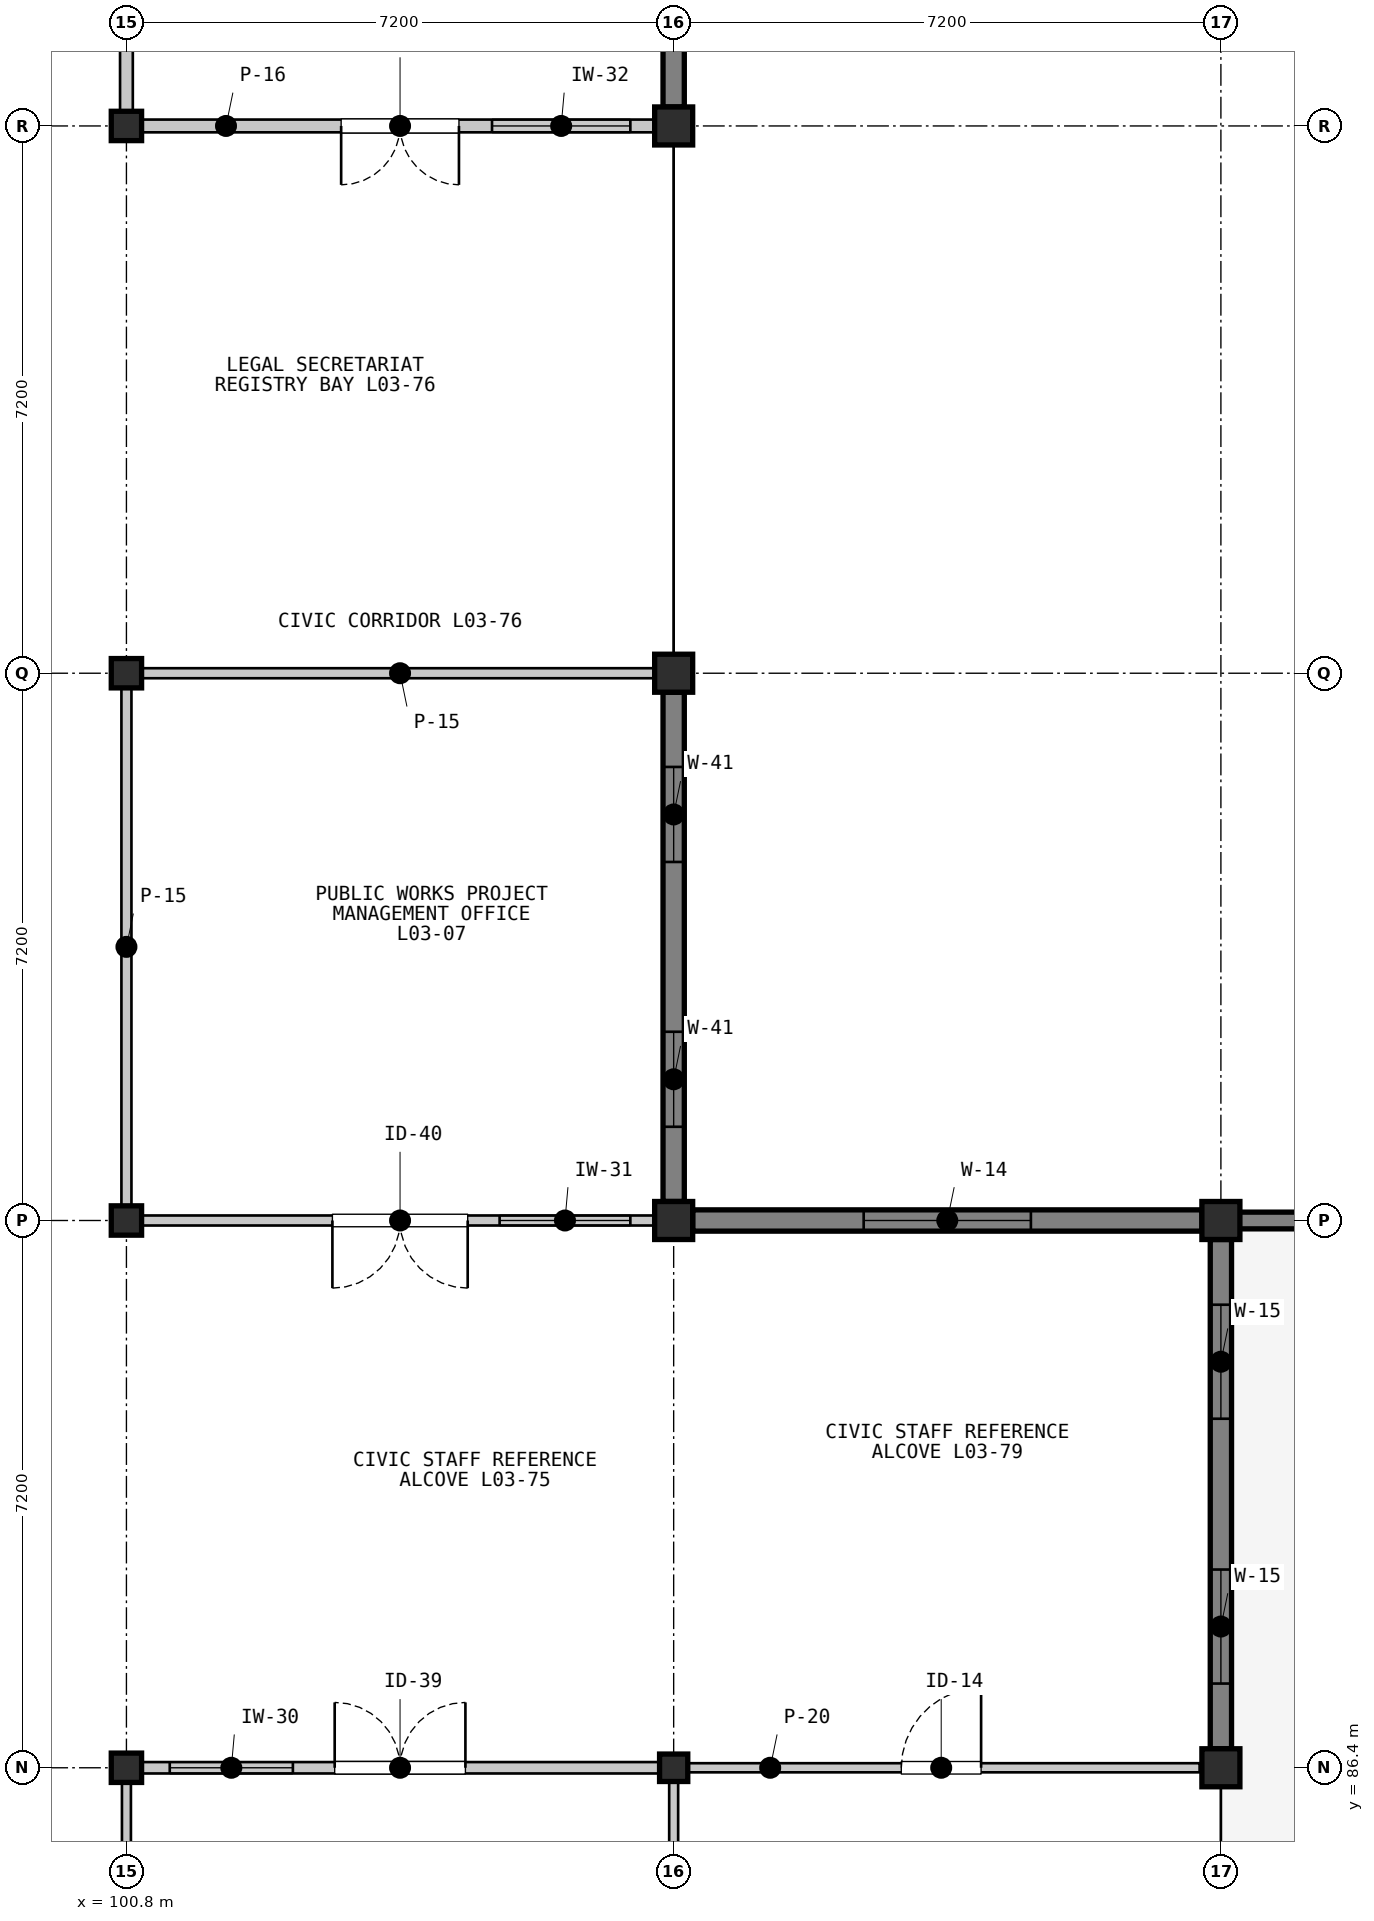
"""IFC4 building model, lengths in metres.
Left out: names, types, materials, properties, quantities, classifications, styles, units other than length and angle.
Written with IfcOpenShell. Run it as: python <this file> out.ifc"""

import sys

from ifc_helpers import new_model, si_unit, direction, frame, frame_2d, origin, origin_2d, place, context, subcontext, project, spatial, rectangle, i_section, extrude, element, fill, save


model = new_model("IFC4")
c1 = context("Model", 3, precision=1e-05, world=origin(), true_north=direction((0.0, 1.0)))
c2 = subcontext(c1, "Body", "Model", "MODEL_VIEW")
j1 = project(units=[si_unit("LENGTHUNIT", "METRE"), si_unit("PLANEANGLEUNIT", "RADIAN")], contexts=[c1])
p1 = place(None, origin())
s1 = spatial("IfcSite", under=j1, at=p1, CompositionType="ELEMENT")
p2 = place(p1, origin())
s2 = spatial("IfcBuilding", under=s1, at=p2, CompositionType="ELEMENT")
p3 = place(p2, frame((0.0, 0.0, 9.9)))
s3 = spatial("IfcBuildingStorey", under=s2, at=p3, CompositionType="ELEMENT", Elevation=9.9)
for number, where, z_axis, x_axis in (
    (1, (100.8, 86.4, 0.0), (0.0, 0.0, 1.0), (1.0, 0.0, 0.0)),
    (2, (100.8, 93.6, 0.0), (0.0, 0.0, 1.0), (1.0, 0.0, 0.0)),
    (3, (100.8, 100.8, 0.0), (0.0, 0.0, 1.0), (1.0, 0.0, 0.0)),
    (4, (100.8, 108.0, 0.0), (0.0, 0.0, 1.0), (1.0, 0.0, 0.0)),
):
    element("IfcColumn", number, at=place(p3, frame(where, z_axis=z_axis, x_axis=x_axis)), inside=s3, PredefinedType="COLUMN", context=c2, shape_type="SweptSolid", body=[
        extrude(i_section(OverallWidth=0.399, OverallDepth=0.386, WebThickness=0.021, FlangeThickness=0.033, FilletRadius=0.015, at=origin_2d()), origin(), (0.0, 0.0, 1.0), 4.2),
    ])
p4 = place(p3, frame((108.0, 86.4, 0.0), z_axis=(0.0, 0.0, 1.0), x_axis=(1.0, 0.0, 0.0)))
e5 = element("IfcColumn", 5, at=p4, inside=s3, PredefinedType="COLUMN", context=c2, shape_type="SweptSolid", body=[
    extrude(i_section(OverallWidth=0.371, OverallDepth=0.361, WebThickness=0.012, FlangeThickness=0.02, FilletRadius=0.015, at=origin_2d()), origin(), (0.0, 0.0, 1.0), 4.2),
])
for number, where, z_axis, x_axis in (
    (6, (108.0, 93.6, 0.0), (0.0, 0.0, 1.0), (1.0, 0.0, 0.0)),
    (7, (108.0, 100.8, 0.0), (0.0, 0.0, 1.0), (1.0, 0.0, 0.0)),
    (8, (108.0, 108.0, 0.0), (0.0, 0.0, 1.0), (1.0, 0.0, 0.0)),
    (9, (115.2, 86.4, 0.0), (0.0, 0.0, 1.0), (1.0, 0.0, 0.0)),
    (10, (115.2, 93.6, 0.0), (0.0, 0.0, 1.0), (1.0, 0.0, 0.0)),
):
    element("IfcColumn", number, at=place(p3, frame(where, z_axis=z_axis, x_axis=x_axis)), inside=s3, PredefinedType="COLUMN", context=c2, shape_type="SweptSolid", body=[
        extrude(rectangle(XDim=0.5, YDim=0.5, at=origin_2d()), origin(), (0.0, 0.0, 1.0), 4.2),
    ])
p5 = place(p3, frame((108.0, 100.55, 0.0), z_axis=(0.0, 0.0, 1.0), x_axis=(0.0, -1.0, 0.0)))
e11 = element("IfcWall", 11, at=p5, inside=s3, PredefinedType="SOLIDWALL", context=c2, shape_type="SweptSolid", body=[
    extrude(rectangle(XDim=6.7, YDim=0.28, at=frame_2d((3.35, 0.0))), origin(), (0.0, 0.0, 1.0), 3.487),
])
p6 = place(p5, frame((0.983, 0.0, 0.95)))
e12 = element("IfcOpeningElement", 12, at=p6, cuts=e11, PredefinedType="OPENING", context=c2, shape_type="SweptSolid", body=[
    extrude(rectangle(XDim=1.25, YDim=1.85, at=frame_2d((0.625, 0.925))), frame((0.0, 0.15, 0.0), z_axis=(0.0, -1.0, 0.0), x_axis=(1.0, 0.0, 0.0)), (0.0, 0.0, 1.0), 0.3),
])
p7 = place(p5, frame((4.467, 0.0, 0.95)))
e13 = element("IfcOpeningElement", 13, at=p7, cuts=e11, PredefinedType="OPENING", context=c2, shape_type="SweptSolid", body=[
    extrude(rectangle(XDim=1.25, YDim=1.85, at=frame_2d((0.625, 0.925))), frame((0.0, 0.15, 0.0), z_axis=(0.0, -1.0, 0.0), x_axis=(1.0, 0.0, 0.0)), (0.0, 0.0, 1.0), 0.3),
])
p8 = place(p3, frame((108.0, 114.95, 0.0), z_axis=(0.0, 0.0, 1.0), x_axis=(0.0, -1.0, 0.0)))
e14 = element("IfcWall", 14, at=p8, inside=s3, PredefinedType="SOLIDWALL", context=c2, shape_type="SweptSolid", body=[
    extrude(rectangle(XDim=6.7, YDim=0.28, at=frame_2d((3.35, 0.0))), origin(), (0.0, 0.0, 1.0), 3.487),
])
p9 = place(p8, frame((0.883, 0.0, 0.95)))
e15 = element("IfcOpeningElement", 15, at=p9, cuts=e14, PredefinedType="OPENING", context=c2, shape_type="SweptSolid", body=[
    extrude(rectangle(XDim=1.45, YDim=1.85, at=frame_2d((0.725, 0.925))), frame((0.0, 0.15, 0.0), z_axis=(0.0, -1.0, 0.0), x_axis=(1.0, 0.0, 0.0)), (0.0, 0.0, 1.0), 0.3),
])
p10 = place(p8, frame((4.367, 0.0, 0.95)))
e16 = element("IfcOpeningElement", 16, at=p10, cuts=e14, PredefinedType="OPENING", context=c2, shape_type="SweptSolid", body=[
    extrude(rectangle(XDim=1.45, YDim=1.85, at=frame_2d((0.725, 0.925))), frame((0.0, 0.15, 0.0), z_axis=(0.0, -1.0, 0.0), x_axis=(1.0, 0.0, 0.0)), (0.0, 0.0, 1.0), 0.3),
])
p11 = place(p3, frame((108.25, 93.6, 0.0), z_axis=(0.0, 0.0, 1.0), x_axis=(1.0, 0.0, 0.0)))
e17 = element("IfcWall", 17, at=p11, inside=s3, PredefinedType="SOLIDWALL", context=c2, shape_type="SweptSolid", body=[
    extrude(rectangle(XDim=6.7, YDim=0.28, at=frame_2d((3.35, 0.0))), origin(), (0.0, 0.0, 1.0), 3.398),
])
p12 = place(p11, frame((2.25, 0.0, 0.95)))
e18 = element("IfcOpeningElement", 18, at=p12, cuts=e17, PredefinedType="OPENING", context=c2, shape_type="SweptSolid", body=[
    extrude(rectangle(XDim=2.2, YDim=1.9, at=frame_2d((1.1, 0.95))), frame((0.0, 0.15, 0.0), z_axis=(0.0, -1.0, 0.0), x_axis=(1.0, 0.0, 0.0)), (0.0, 0.0, 1.0), 0.3),
])
p13 = place(p3, frame((115.2, 93.35, 0.0), z_axis=(0.0, 0.0, 1.0), x_axis=(0.0, -1.0, 0.0)))
e19 = element("IfcWall", 19, at=p13, inside=s3, PredefinedType="SOLIDWALL", context=c2, shape_type="SweptSolid", body=[
    extrude(rectangle(XDim=6.7, YDim=0.28, at=frame_2d((3.35, 0.0))), origin(), (0.0, 0.0, 1.0), 3.467),
])
p14 = place(p13, frame((0.858, 0.0, 0.95)))
e20 = element("IfcOpeningElement", 20, at=p14, cuts=e19, PredefinedType="OPENING", context=c2, shape_type="SweptSolid", body=[
    extrude(rectangle(XDim=1.5, YDim=1.9, at=frame_2d((0.75, 0.95))), frame((0.0, 0.15, 0.0), z_axis=(0.0, -1.0, 0.0), x_axis=(1.0, 0.0, 0.0)), (0.0, 0.0, 1.0), 0.3),
])
p15 = place(p13, frame((4.342, 0.0, 0.95)))
e21 = element("IfcOpeningElement", 21, at=p15, cuts=e19, PredefinedType="OPENING", context=c2, shape_type="SweptSolid", body=[
    extrude(rectangle(XDim=1.5, YDim=1.9, at=frame_2d((0.75, 0.95))), frame((0.0, 0.15, 0.0), z_axis=(0.0, -1.0, 0.0), x_axis=(1.0, 0.0, 0.0)), (0.0, 0.0, 1.0), 0.3),
])
p16 = place(p3, frame((115.35, 93.6, 0.0), z_axis=(0.0, 0.0, 1.0), x_axis=(1.0, 0.0, 0.0)))
e22 = element("IfcWall", 22, at=p16, inside=s3, PredefinedType="PARAPET", context=c2, shape_type="SweptSolid", body=[
    extrude(rectangle(XDim=6.9, YDim=0.22, at=frame_2d((3.45, 0.0))), origin(), (0.0, 0.0, 1.0), 0.85),
])
p17 = place(p3, frame((100.92, 86.4, 0.0), z_axis=(0.0, 0.0, 1.0), x_axis=(1.0, 0.0, 0.0)))
e23 = element("IfcWall", 23, at=p17, inside=s3, PredefinedType="PARTITIONING", context=c2, shape_type="SweptSolid", body=[
    extrude(rectangle(XDim=6.96, YDim=0.15, at=frame_2d((3.48, 0.0))), origin(), (0.0, 0.0, 1.0), 3.408),
])
p18 = place(p17, frame((2.62, 0.0, 0.0)))
e24 = element("IfcOpeningElement", 24, at=p18, cuts=e23, PredefinedType="OPENING", context=c2, shape_type="SweptSolid", body=[
    extrude(rectangle(XDim=1.72, YDim=2.32, at=frame_2d((0.86, 1.16))), frame((0.0, 0.085, 0.0), z_axis=(0.0, -1.0, 0.0), x_axis=(1.0, 0.0, 0.0)), (0.0, 0.0, 1.0), 0.17),
])
p19 = place(p17, frame((0.45, 0.0, 1.05)))
e25 = element("IfcOpeningElement", 25, at=p19, cuts=e23, PredefinedType="OPENING", context=c2, shape_type="SweptSolid", body=[
    extrude(rectangle(XDim=1.62, YDim=0.96, at=frame_2d((0.81, 0.48))), frame((0.0, 0.085, 0.0), z_axis=(0.0, -1.0, 0.0), x_axis=(1.0, 0.0, 0.0)), (0.0, 0.0, 1.0), 0.17),
])
p20 = place(p3, frame((100.8, 79.32, 0.0), z_axis=(0.0, 0.0, 1.0), x_axis=(0.0, 1.0, 0.0)))
e26 = element("IfcWall", 26, at=p20, inside=s3, PredefinedType="PARTITIONING", context=c2, shape_type="SweptSolid", body=[
    extrude(rectangle(XDim=6.96, YDim=0.118, at=frame_2d((3.48, 0.0))), origin(), (0.0, 0.0, 1.0), 3.408),
])
p21 = place(p3, frame((108.0, 86.28, 0.0), z_axis=(0.0, 0.0, 1.0), x_axis=(0.0, -1.0, 0.0)))
e27 = element("IfcWall", 27, at=p21, inside=s3, PredefinedType="PARTITIONING", context=c2, shape_type="SweptSolid", body=[
    extrude(rectangle(XDim=6.96, YDim=0.118, at=frame_2d((3.48, 0.0))), origin(), (0.0, 0.0, 1.0), 3.388),
])
p22 = place(p3, frame((107.88, 93.6, 0.0), z_axis=(0.0, 0.0, 1.0), x_axis=(-1.0, 0.0, 0.0)))
e28 = element("IfcWall", 28, at=p22, inside=s3, PredefinedType="PARTITIONING", context=c2, shape_type="SweptSolid", body=[
    extrude(rectangle(XDim=6.96, YDim=0.132, at=frame_2d((3.48, 0.0))), origin(), (0.0, 0.0, 1.0), 3.408),
])
p23 = place(p22, frame((2.59, 0.0, 0.0)))
e29 = element("IfcOpeningElement", 29, at=p23, cuts=e28, PredefinedType="OPENING", context=c2, shape_type="SweptSolid", body=[
    extrude(rectangle(XDim=1.78, YDim=2.36, at=frame_2d((0.89, 1.18))), frame((0.0, 0.076, 0.0), z_axis=(0.0, -1.0, 0.0), x_axis=(1.0, 0.0, 0.0)), (0.0, 0.0, 1.0), 0.152),
])
p24 = place(p22, frame((0.45, 0.0, 1.05)))
e30 = element("IfcOpeningElement", 30, at=p24, cuts=e28, PredefinedType="OPENING", context=c2, shape_type="SweptSolid", body=[
    extrude(rectangle(XDim=1.72, YDim=1.02, at=frame_2d((0.86, 0.51))), frame((0.0, 0.076, 0.0), z_axis=(0.0, -1.0, 0.0), x_axis=(1.0, 0.0, 0.0)), (0.0, 0.0, 1.0), 0.152),
])
for number, where, z_axis, x_axis in (
    (31, (100.92, 100.8, 0.0), (0.0, 0.0, 1.0), (1.0, 0.0, 0.0)),
    (32, (100.8, 93.72, 0.0), (0.0, 0.0, 1.0), (0.0, 1.0, 0.0)),
):
    element("IfcWall", number, at=place(p3, frame(where, z_axis=z_axis, x_axis=x_axis)), inside=s3, PredefinedType="PARTITIONING", context=c2, shape_type="SweptSolid", body=[
        extrude(rectangle(XDim=6.96, YDim=0.132, at=frame_2d((3.48, 0.0))), origin(), (0.0, 0.0, 1.0), 3.408),
    ])
p25 = place(p3, frame((107.88, 108.0, 0.0), z_axis=(0.0, 0.0, 1.0), x_axis=(-1.0, 0.0, 0.0)))
e33 = element("IfcWall", 33, at=p25, inside=s3, PredefinedType="PARTITIONING", context=c2, shape_type="SweptSolid", body=[
    extrude(rectangle(XDim=6.96, YDim=0.168, at=frame_2d((3.48, 0.0))), origin(), (0.0, 0.0, 1.0), 3.408),
])
p26 = place(p25, frame((2.705, 0.0, 0.0)))
e34 = element("IfcOpeningElement", 34, at=p26, cuts=e33, PredefinedType="OPENING", context=c2, shape_type="SweptSolid", body=[
    extrude(rectangle(XDim=1.55, YDim=2.3, at=frame_2d((0.775, 1.15))), frame((0.0, 0.094, 0.0), z_axis=(0.0, -1.0, 0.0), x_axis=(1.0, 0.0, 0.0)), (0.0, 0.0, 1.0), 0.188),
])
p27 = place(p25, frame((0.45, 0.0, 1.05)))
e35 = element("IfcOpeningElement", 35, at=p27, cuts=e33, PredefinedType="OPENING", context=c2, shape_type="SweptSolid", body=[
    extrude(rectangle(XDim=1.82, YDim=1.02, at=frame_2d((0.91, 0.51))), frame((0.0, 0.094, 0.0), z_axis=(0.0, -1.0, 0.0), x_axis=(1.0, 0.0, 0.0)), (0.0, 0.0, 1.0), 0.188),
])
p28 = place(p3, frame((100.8, 108.12, 0.0), z_axis=(0.0, 0.0, 1.0), x_axis=(0.0, 1.0, 0.0)))
e36 = element("IfcWall", 36, at=p28, inside=s3, PredefinedType="PARTITIONING", context=c2, shape_type="SweptSolid", body=[
    extrude(rectangle(XDim=6.96, YDim=0.168, at=frame_2d((3.48, 0.0))), origin(), (0.0, 0.0, 1.0), 3.408),
])
p29 = place(p3, frame((108.12, 86.4, 0.0), z_axis=(0.0, 0.0, 1.0), x_axis=(1.0, 0.0, 0.0)))
e37 = element("IfcWall", 37, at=p29, inside=s3, PredefinedType="PARTITIONING", context=c2, shape_type="SweptSolid", body=[
    extrude(rectangle(XDim=6.8, YDim=0.12, at=frame_2d((3.4, 0.0))), origin(), (0.0, 0.0, 1.0), 3.388),
])
p30 = place(p29, frame((2.875, 0.0, 0.0)))
e38 = element("IfcOpeningElement", 38, at=p30, cuts=e37, PredefinedType="OPENING", context=c2, shape_type="SweptSolid", body=[
    extrude(rectangle(XDim=1.05, YDim=2.15, at=frame_2d((0.525, 1.075))), frame((0.0, 0.07, 0.0), z_axis=(0.0, -1.0, 0.0), x_axis=(1.0, 0.0, 0.0)), (0.0, 0.0, 1.0), 0.14),
])
p31 = place(p6, origin())
e39 = element("IfcWindow", 39, at=p31, inside=s3, PartitioningType="SINGLE_PANEL", PredefinedType="WINDOW", context=c2, shape_type="SweptSolid", body=[
    extrude(rectangle(XDim=1.25, YDim=1.85, at=frame_2d((0.625, 0.925))), frame((0.0, 0.03, 0.0), z_axis=(0.0, -1.0, 0.0), x_axis=(1.0, 0.0, 0.0)), (0.0, 0.0, 1.0), 0.06),
])
fill(e12, e39)
p32 = place(p7, origin())
e40 = element("IfcWindow", 40, at=p32, inside=s3, PartitioningType="SINGLE_PANEL", PredefinedType="WINDOW", context=c2, shape_type="SweptSolid", body=[
    extrude(rectangle(XDim=1.25, YDim=1.85, at=frame_2d((0.625, 0.925))), frame((0.0, 0.03, 0.0), z_axis=(0.0, -1.0, 0.0), x_axis=(1.0, 0.0, 0.0)), (0.0, 0.0, 1.0), 0.06),
])
fill(e13, e40)
p33 = place(p12, origin())
e41 = element("IfcWindow", 41, at=p33, inside=s3, PartitioningType="SINGLE_PANEL", PredefinedType="WINDOW", context=c2, shape_type="SweptSolid", body=[
    extrude(rectangle(XDim=2.2, YDim=1.9, at=frame_2d((1.1, 0.95))), frame((0.0, 0.03, 0.0), z_axis=(0.0, -1.0, 0.0), x_axis=(1.0, 0.0, 0.0)), (0.0, 0.0, 1.0), 0.06),
])
fill(e18, e41)
p34 = place(p14, origin())
e42 = element("IfcWindow", 42, at=p34, inside=s3, PartitioningType="SINGLE_PANEL", PredefinedType="WINDOW", context=c2, shape_type="SweptSolid", body=[
    extrude(rectangle(XDim=1.5, YDim=1.9, at=frame_2d((0.75, 0.95))), frame((0.0, 0.03, 0.0), z_axis=(0.0, -1.0, 0.0), x_axis=(1.0, 0.0, 0.0)), (0.0, 0.0, 1.0), 0.06),
])
fill(e20, e42)
p35 = place(p15, origin())
e43 = element("IfcWindow", 43, at=p35, inside=s3, PartitioningType="SINGLE_PANEL", PredefinedType="WINDOW", context=c2, shape_type="SweptSolid", body=[
    extrude(rectangle(XDim=1.5, YDim=1.9, at=frame_2d((0.75, 0.95))), frame((0.0, 0.03, 0.0), z_axis=(0.0, -1.0, 0.0), x_axis=(1.0, 0.0, 0.0)), (0.0, 0.0, 1.0), 0.06),
])
fill(e21, e43)
p36 = place(p18, origin())
e44 = element("IfcDoor", 44, at=p36, inside=s3, OperationType="DOUBLE_DOOR_SINGLE_SWING", PredefinedType="DOOR", context=c2, shape_type="SweptSolid", body=[
    extrude(rectangle(XDim=1.72, YDim=2.32, at=frame_2d((0.86, 1.16))), frame((0.0, 0.025, 0.0), z_axis=(0.0, -1.0, 0.0), x_axis=(1.0, 0.0, 0.0)), (0.0, 0.0, 1.0), 0.05),
])
fill(e24, e44)
p37 = place(p19, origin())
e45 = element("IfcWindow", 45, at=p37, inside=s3, PartitioningType="SINGLE_PANEL", PredefinedType="WINDOW", context=c2, shape_type="SweptSolid", body=[
    extrude(rectangle(XDim=1.62, YDim=0.96, at=frame_2d((0.81, 0.48))), frame((0.0, 0.03, 0.0), z_axis=(0.0, -1.0, 0.0), x_axis=(1.0, 0.0, 0.0)), (0.0, 0.0, 1.0), 0.06),
])
fill(e25, e45)
p38 = place(p23, origin())
e46 = element("IfcDoor", 46, at=p38, inside=s3, OperationType="DOUBLE_DOOR_SINGLE_SWING", PredefinedType="DOOR", context=c2, shape_type="SweptSolid", body=[
    extrude(rectangle(XDim=1.78, YDim=2.36, at=frame_2d((0.89, 1.18))), frame((0.0, 0.025, 0.0), z_axis=(0.0, -1.0, 0.0), x_axis=(1.0, 0.0, 0.0)), (0.0, 0.0, 1.0), 0.05),
])
fill(e29, e46)
p39 = place(p24, origin())
e47 = element("IfcWindow", 47, at=p39, inside=s3, PartitioningType="SINGLE_PANEL", PredefinedType="WINDOW", context=c2, shape_type="SweptSolid", body=[
    extrude(rectangle(XDim=1.72, YDim=1.02, at=frame_2d((0.86, 0.51))), frame((0.0, 0.03, 0.0), z_axis=(0.0, -1.0, 0.0), x_axis=(1.0, 0.0, 0.0)), (0.0, 0.0, 1.0), 0.06),
])
fill(e30, e47)
p40 = place(p26, origin())
e48 = element("IfcDoor", 48, at=p40, inside=s3, OperationType="DOUBLE_DOOR_SINGLE_SWING", PredefinedType="DOOR", context=c2, shape_type="SweptSolid", body=[
    extrude(rectangle(XDim=1.55, YDim=2.3, at=frame_2d((0.775, 1.15))), frame((0.0, 0.025, 0.0), z_axis=(0.0, -1.0, 0.0), x_axis=(1.0, 0.0, 0.0)), (0.0, 0.0, 1.0), 0.05),
])
fill(e34, e48)
p41 = place(p27, origin())
e49 = element("IfcWindow", 49, at=p41, inside=s3, PartitioningType="SINGLE_PANEL", PredefinedType="WINDOW", context=c2, shape_type="SweptSolid", body=[
    extrude(rectangle(XDim=1.82, YDim=1.02, at=frame_2d((0.91, 0.51))), frame((0.0, 0.03, 0.0), z_axis=(0.0, -1.0, 0.0), x_axis=(1.0, 0.0, 0.0)), (0.0, 0.0, 1.0), 0.06),
])
fill(e35, e49)
p42 = place(p30, origin())
e50 = element("IfcDoor", 50, at=p42, inside=s3, OperationType="SINGLE_SWING_RIGHT", PredefinedType="DOOR", context=c2, shape_type="SweptSolid", body=[
    extrude(rectangle(XDim=1.05, YDim=2.15, at=frame_2d((0.525, 1.075))), frame((0.0, 0.025, 0.0), z_axis=(0.0, -1.0, 0.0), x_axis=(1.0, 0.0, 0.0)), (0.0, 0.0, 1.0), 0.05),
])
fill(e38, e50)
save(model, sys.argv[1])
